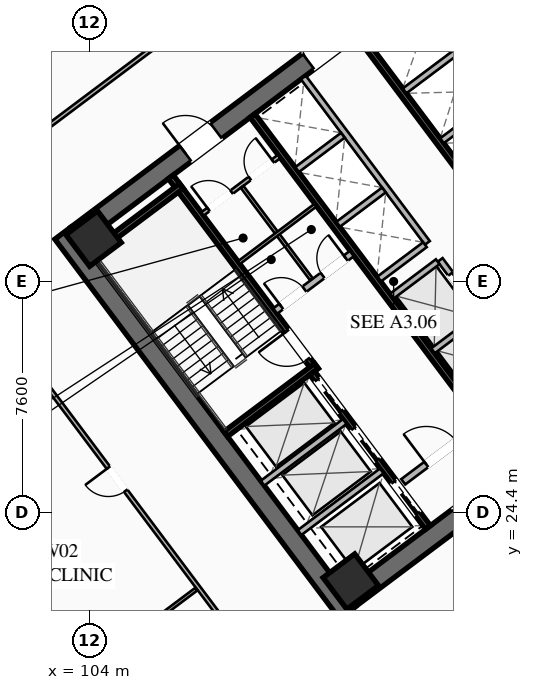
"""IFC4 building model, lengths in metres.
Left out: names, types, materials, properties, quantities, classifications, styles, units other than length and angle.
Written with IfcOpenShell. Run it as: python <this file> out.ifc"""

import sys

from ifc_helpers import new_model, si_unit, direction, frame, frame_2d, origin, origin_2d, place, context, subcontext, project, spatial, rectangle, hollow_rectangle, extrude, element, fill, save


model = new_model("IFC4")
c1 = context("Model", 3, precision=1e-05, world=origin(), true_north=direction((0.0, 1.0)))
c2 = subcontext(c1, "Body", "Model", "MODEL_VIEW")
j1 = project(units=[si_unit("LENGTHUNIT", "METRE"), si_unit("PLANEANGLEUNIT", "RADIAN")], contexts=[c1])
p1 = place(None, origin())
s1 = spatial("IfcSite", under=j1, at=p1, CompositionType="ELEMENT")
p2 = place(p1, origin())
s2 = spatial("IfcBuilding", under=s1, at=p2, CompositionType="ELEMENT")
p3 = place(p2, frame((0.0, 0.0, 88.5)))
s3 = spatial("IfcBuildingStorey", under=s2, at=p3, CompositionType="ELEMENT", Elevation=88.5)
for number, where, z_axis, x_axis in (
    (1, (112.476, 21.107, 0.0), (0.0, 0.0, 1.0), (-0.6, 0.8, 0.0)),
    (2, (115.524, 42.893, 0.0), (0.0, 0.0, 1.0), (0.6, -0.8, 0.0)),
):
    element("IfcWall", number, at=place(p3, frame(where, z_axis=z_axis, x_axis=x_axis)), inside=s3, PredefinedType="SHEAR", context=c2, shape_type="SweptSolid", body=[
        extrude(rectangle(XDim=15.6, YDim=0.65, at=frame_2d((7.8, 0.0))), origin(), (0.0, 0.0, 1.0), 3.55),
    ])
p4 = place(p3, frame((124.429, 30.478, 0.0), z_axis=(0.0, 0.0, 1.0), x_axis=(-0.799998028465, -0.600002628705, 0.0)))
e3 = element("IfcWall", 3, at=p4, inside=s3, PredefinedType="SHEAR", context=c2, shape_type="SweptSolid", body=[
    extrude(rectangle(XDim=14.86, YDim=0.65, at=frame_2d((7.43, 0.0))), origin(), (0.0, 0.0, 1.0), 3.55),
])
p5 = place(p4, frame((9.13, 0.0, 0.0)))
e4 = element("IfcOpeningElement", 4, at=p5, cuts=e3, PredefinedType="OPENING", context=c2, shape_type="SweptSolid", body=[
    extrude(rectangle(XDim=1.25, YDim=2.25, at=frame_2d((0.625, 1.125))), frame((0.0, 0.335, 0.0), z_axis=(0.0, -1.0, 0.0), x_axis=(1.0, 0.0, 0.0)), (0.0, 0.0, 1.0), 0.67),
])
p6 = place(p4, frame((4.08, 0.0, 0.0)))
e5 = element("IfcOpeningElement", 5, at=p6, cuts=e3, PredefinedType="OPENING", context=c2, shape_type="SweptSolid", body=[
    extrude(rectangle(XDim=1.25, YDim=2.25, at=frame_2d((0.625, 1.125))), frame((0.0, 0.335, 0.0), z_axis=(0.0, -1.0, 0.0), x_axis=(1.0, 0.0, 0.0)), (0.0, 0.0, 1.0), 0.67),
])
p7 = place(p3, frame((103.571, 33.522, 0.0), z_axis=(0.0, 0.0, 1.0), x_axis=(0.799998028465, 0.600002628705, 0.0)))
e6 = element("IfcWall", 6, at=p7, inside=s3, PredefinedType="SHEAR", context=c2, shape_type="SweptSolid", body=[
    extrude(rectangle(XDim=14.86, YDim=0.65, at=frame_2d((7.43, 0.0))), origin(), (0.0, 0.0, 1.0), 3.55),
])
p8 = place(p7, frame((4.48, 0.0, 0.0)))
e7 = element("IfcOpeningElement", 7, at=p8, cuts=e6, PredefinedType="OPENING", context=c2, shape_type="SweptSolid", body=[
    extrude(rectangle(XDim=1.25, YDim=2.25, at=frame_2d((0.625, 1.125))), frame((0.0, 0.335, 0.0), z_axis=(0.0, -1.0, 0.0), x_axis=(1.0, 0.0, 0.0)), (0.0, 0.0, 1.0), 0.67),
])
p9 = place(p7, frame((9.53, 0.0, 0.0)))
e8 = element("IfcOpeningElement", 8, at=p9, cuts=e6, PredefinedType="OPENING", context=c2, shape_type="SweptSolid", body=[
    extrude(rectangle(XDim=1.25, YDim=2.25, at=frame_2d((0.625, 1.125))), frame((0.0, 0.335, 0.0), z_axis=(0.0, -1.0, 0.0), x_axis=(1.0, 0.0, 0.0)), (0.0, 0.0, 1.0), 0.67),
])
for number, where, z_axis, x_axis in (
    (9, (112.59, 22.13, 0.0), (0.0, 0.0, 1.0), (0.8, 0.6, 0.0)),
    (10, (104.13, 33.41, 0.0), (0.0, 0.0, 1.0), (0.8, 0.6, 0.0)),
):
    element("IfcColumn", number, at=place(p3, frame(where, z_axis=z_axis, x_axis=x_axis)), inside=s3, PredefinedType="COLUMN", context=c2, shape_type="SweptSolid", body=[
        extrude(hollow_rectangle(XDim=1.3, YDim=1.3, WallThickness=0.05, at=origin_2d()), origin(), (0.0, 0.0, 1.0), 3.35),
    ])
p10 = place(p3, frame((111.44, 29.08, 0.0), z_axis=(0.0, 0.0, 1.0), x_axis=(-0.600009827119, 0.799992629566, 0.0)))
e11 = element("IfcWall", 11, at=p10, inside=s3, PredefinedType="SHEAR", context=c2, shape_type="SweptSolid", body=[
    extrude(rectangle(XDim=7.95, YDim=0.2, at=frame_2d((3.975, 0.0))), origin(), (0.0, 0.0, 1.0), 3.35),
])
p11 = place(p10, frame((0.45, 0.0, 0.0)))
e12 = element("IfcOpeningElement", 12, at=p11, cuts=e11, PredefinedType="OPENING", context=c2, shape_type="SweptSolid", body=[
    extrude(rectangle(XDim=1.15, YDim=2.2, at=frame_2d((0.575, 1.1))), frame((0.0, 0.11, 0.0), z_axis=(0.0, -1.0, 0.0), x_axis=(1.0, 0.0, 0.0)), (0.0, 0.0, 1.0), 0.22),
])
for number, where, z_axis, x_axis in (
    (13, (108.476, 26.982, 0.0), (0.0, 0.0, 1.0), (0.8, 0.6, 0.0)),
    (14, (104.036, 32.902, 0.0), (0.0, 0.0, 1.0), (0.8, 0.6, 0.0)),
):
    element("IfcWall", number, at=place(p3, frame(where, z_axis=z_axis, x_axis=x_axis)), inside=s3, PredefinedType="SHEAR", context=c2, shape_type="SweptSolid", body=[
        extrude(rectangle(XDim=3.73, YDim=0.2, at=frame_2d((1.865, 0.0))), origin(), (0.0, 0.0, 1.0), 3.35),
    ])
p12 = place(p3, frame((117.938, 26.016, 0.0), z_axis=(0.0, 0.0, 1.0), x_axis=(-0.600005463273, 0.799995902516, 0.0)))
e15 = element("IfcWall", 15, at=p12, inside=s3, PredefinedType="SHEAR", context=c2, shape_type="SweptSolid", body=[
    extrude(rectangle(XDim=14.3, YDim=0.2, at=frame_2d((7.15, 0.0))), origin(), (0.0, 0.0, 1.0), 3.35),
])
p13 = place(p3, frame((110.104, 31.028, 0.0), z_axis=(0.0, 0.0, 1.0), x_axis=(0.800018601094, 0.59997519774, 0.0)))
e16 = element("IfcWall", 16, at=p13, inside=s3, PredefinedType="SOLIDWALL", context=c2, shape_type="SweptSolid", body=[
    extrude(rectangle(XDim=3.15, YDim=0.22, at=frame_2d((1.575, 0.0))), origin(), (0.0, 0.0, 1.0), 2.703),
])
p14 = place(p13, frame((0.25, 0.0, 0.0)))
e17 = element("IfcOpeningElement", 17, at=p14, cuts=e16, PredefinedType="OPENING", context=c2, shape_type="SweptSolid", body=[
    extrude(rectangle(XDim=0.95, YDim=2.05, at=frame_2d((0.475, 1.025))), frame((0.0, 0.12, 0.0), z_axis=(0.0, -1.0, 0.0), x_axis=(1.0, 0.0, 0.0)), (0.0, 0.0, 1.0), 0.24),
])
p15 = place(p13, frame((1.95, 0.0, 0.0)))
e18 = element("IfcOpeningElement", 18, at=p15, cuts=e16, PredefinedType="OPENING", context=c2, shape_type="SweptSolid", body=[
    extrude(rectangle(XDim=0.95, YDim=2.05, at=frame_2d((0.475, 1.025))), frame((0.0, 0.12, 0.0), z_axis=(0.0, -1.0, 0.0), x_axis=(1.0, 0.0, 0.0)), (0.0, 0.0, 1.0), 0.24),
])
p16 = place(p3, frame((114.316, 25.412, 0.0), z_axis=(0.0, 0.0, 1.0), x_axis=(0.800018601094, 0.59997519774, 0.0)))
e19 = element("IfcWall", 19, at=p16, inside=s3, PredefinedType="SOLIDWALL", context=c2, shape_type="SweptSolid", body=[
    extrude(rectangle(XDim=3.15, YDim=0.22, at=frame_2d((1.575, 0.0))), origin(), (0.0, 0.0, 1.0), 2.703),
])
p17 = place(p16, frame((0.95, 0.0, 0.0)))
e20 = element("IfcOpeningElement", 20, at=p17, cuts=e19, PredefinedType="OPENING", context=c2, shape_type="SweptSolid", body=[
    extrude(rectangle(XDim=1.25, YDim=2.25, at=frame_2d((0.625, 1.125))), frame((0.0, 0.12, 0.0), z_axis=(0.0, -1.0, 0.0), x_axis=(1.0, 0.0, 0.0)), (0.0, 0.0, 1.0), 0.24),
])
p18 = place(p3, frame((115.13, 23.91, 0.0), z_axis=(0.0, 0.0, 1.0), x_axis=(-0.599975393228, 0.800018454488, 0.0)))
e21 = element("IfcWall", 21, at=p18, inside=s3, PredefinedType="SHEAR", context=c2, shape_type="SweptSolid", body=[
    extrude(rectangle(XDim=6.35, YDim=0.2, at=frame_2d((3.175, 0.0))), origin(), (0.0, 0.0, 1.0), 3.35),
])
p19 = place(p18, frame((4.775, 0.0, 0.0)))
e22 = element("IfcOpeningElement", 22, at=p19, cuts=e21, PredefinedType="OPENING", context=c2, shape_type="SweptSolid", body=[
    extrude(rectangle(XDim=1.3, YDim=2.25, at=frame_2d((0.65, 1.125))), frame((0.0, 0.11, 0.0), z_axis=(0.0, -1.0, 0.0), x_axis=(1.0, 0.0, 0.0)), (0.0, 0.0, 1.0), 0.22),
])
p20 = place(p18, frame((2.775, 0.0, 0.0)))
e23 = element("IfcOpeningElement", 23, at=p20, cuts=e21, PredefinedType="OPENING", context=c2, shape_type="SweptSolid", body=[
    extrude(rectangle(XDim=1.3, YDim=2.25, at=frame_2d((0.65, 1.125))), frame((0.0, 0.11, 0.0), z_axis=(0.0, -1.0, 0.0), x_axis=(1.0, 0.0, 0.0)), (0.0, 0.0, 1.0), 0.22),
])
p21 = place(p18, frame((0.575, 0.0, 0.0)))
e24 = element("IfcOpeningElement", 24, at=p21, cuts=e21, PredefinedType="OPENING", context=c2, shape_type="SweptSolid", body=[
    extrude(rectangle(XDim=1.3, YDim=2.25, at=frame_2d((0.65, 1.125))), frame((0.0, 0.11, 0.0), z_axis=(0.0, -1.0, 0.0), x_axis=(1.0, 0.0, 0.0)), (0.0, 0.0, 1.0), 0.22),
])
for number, where, z_axis, x_axis in (
    (25, (110.906, 23.742, 0.0), (0.0, 0.0, 1.0), (0.8, 0.6, 0.0)),
    (26, (109.688, 25.366, 0.0), (0.0, 0.0, 1.0), (0.8, 0.6, 0.0)),
):
    element("IfcWall", number, at=place(p3, frame(where, z_axis=z_axis, x_axis=x_axis)), inside=s3, PredefinedType="SOLIDWALL", context=c2, shape_type="SweptSolid", body=[
        extrude(rectangle(XDim=3.38, YDim=0.2, at=frame_2d((1.69, 0.0))), origin(), (0.0, 0.0, 1.0), 3.35),
    ])
p22 = place(p3, frame((112.87, 40.09, 0.0), z_axis=(0.0, 0.0, 1.0), x_axis=(0.599975393228, -0.800018454488, 0.0)))
e27 = element("IfcWall", 27, at=p22, inside=s3, PredefinedType="SHEAR", context=c2, shape_type="SweptSolid", body=[
    extrude(rectangle(XDim=6.35, YDim=0.2, at=frame_2d((3.175, 0.0))), origin(), (0.0, 0.0, 1.0), 3.35),
])
for number, where, z_axis, x_axis in (
    (28, (115.59, 36.63, 0.0), (0.0, 0.0, 1.0), (0.8, 0.6, 0.0)),
    (29, (114.36, 38.27, 0.0), (0.0, 0.0, 1.0), (0.8, 0.6, 0.0)),
):
    element("IfcWall", number, at=place(p3, frame(where, z_axis=z_axis, x_axis=x_axis)), inside=s3, PredefinedType="SOLIDWALL", context=c2, shape_type="SweptSolid", body=[
        extrude(rectangle(XDim=3.38, YDim=0.2, at=frame_2d((1.69, 0.0))), origin(), (0.0, 0.0, 1.0), 3.35),
    ])
p23 = place(p3, frame((107.71, 34.22, 0.0), z_axis=(0.0, 0.0, 1.0), x_axis=(0.799981399002, 0.60002480053, 0.0)))
e30 = element("IfcWall", 30, at=p23, inside=s3, PredefinedType="PARTITIONING", context=c2, shape_type="SweptSolid", body=[
    extrude(rectangle(XDim=3.15, YDim=0.135, at=frame_2d((1.575, 0.0))), origin(), (0.0, 0.0, 1.0), 2.703),
])
p24 = place(p23, frame((0.25, 0.0, 0.0)))
e31 = element("IfcOpeningElement", 31, at=p24, cuts=e30, PredefinedType="OPENING", context=c2, shape_type="SweptSolid", body=[
    extrude(rectangle(XDim=0.95, YDim=2.05, at=frame_2d((0.475, 1.025))), frame((0.0, 0.077, 0.0), z_axis=(0.0, -1.0, 0.0), x_axis=(1.0, 0.0, 0.0)), (0.0, 0.0, 1.0), 0.155),
])
p25 = place(p23, frame((1.95, 0.0, 0.0)))
e32 = element("IfcOpeningElement", 32, at=p25, cuts=e30, PredefinedType="OPENING", context=c2, shape_type="SweptSolid", body=[
    extrude(rectangle(XDim=0.95, YDim=2.05, at=frame_2d((0.475, 1.025))), frame((0.0, 0.077, 0.0), z_axis=(0.0, -1.0, 0.0), x_axis=(1.0, 0.0, 0.0)), (0.0, 0.0, 1.0), 0.155),
])
p26 = place(p3, frame((111.296, 32.072, 0.0), z_axis=(0.0, 0.0, 1.0), x_axis=(-0.59995887973, 0.800030838552, 0.0)))
e33 = element("IfcWall", 33, at=p26, inside=s3, PredefinedType="PARTITIONING", context=c2, shape_type="SweptSolid", body=[
    extrude(rectangle(XDim=3.8, YDim=0.11, at=frame_2d((1.9, 0.0))), origin(), (0.0, 0.0, 1.0), 2.703),
])
p27 = place(p3, frame((108.91, 32.62, 0.0), z_axis=(0.0, 0.0, 1.0), x_axis=(0.800018601094, 0.59997519774, 0.0)))
e34 = element("IfcWall", 34, at=p27, inside=s3, PredefinedType="PARTITIONING", context=c2, shape_type="SweptSolid", body=[
    extrude(rectangle(XDim=3.15, YDim=0.11, at=frame_2d((1.575, 0.0))), origin(), (0.0, 0.0, 1.0), 2.703),
])
p28 = place(p3, frame((119.61, 27.27, 0.0), z_axis=(0.0, 0.0, 1.0), x_axis=(-0.600011488909, 0.79999138319, 0.0)))
e35 = element("IfcWall", 35, at=p28, inside=s3, PredefinedType="SOLIDWALL", context=c2, shape_type="SweptSolid", body=[
    extrude(rectangle(XDim=6.8, YDim=0.2, at=frame_2d((3.4, 0.0))), origin(), (0.0, 0.0, 1.0), 3.35),
])
p29 = place(p28, frame((0.625, 0.0, 0.0)))
e36 = element("IfcOpeningElement", 36, at=p29, cuts=e35, PredefinedType="OPENING", context=c2, shape_type="SweptSolid", body=[
    extrude(rectangle(XDim=1.1, YDim=2.2, at=frame_2d((0.55, 1.1))), frame((0.0, 0.11, 0.0), z_axis=(0.0, -1.0, 0.0), x_axis=(1.0, 0.0, 0.0)), (0.0, 0.0, 1.0), 0.22),
])
p30 = place(p28, frame((2.875, 0.0, 0.0)))
e37 = element("IfcOpeningElement", 37, at=p30, cuts=e35, PredefinedType="OPENING", context=c2, shape_type="SweptSolid", body=[
    extrude(rectangle(XDim=1.1, YDim=2.2, at=frame_2d((0.55, 1.1))), frame((0.0, 0.11, 0.0), z_axis=(0.0, -1.0, 0.0), x_axis=(1.0, 0.0, 0.0)), (0.0, 0.0, 1.0), 0.22),
])
p31 = place(p28, frame((5.125, 0.0, 0.0)))
e38 = element("IfcOpeningElement", 38, at=p31, cuts=e35, PredefinedType="OPENING", context=c2, shape_type="SweptSolid", body=[
    extrude(rectangle(XDim=1.1, YDim=2.2, at=frame_2d((0.55, 1.1))), frame((0.0, 0.11, 0.0), z_axis=(0.0, -1.0, 0.0), x_axis=(1.0, 0.0, 0.0)), (0.0, 0.0, 1.0), 0.22),
])
p32 = place(p3, frame((115.296, 29.722, 0.0), z_axis=(0.0, 0.0, 1.0), x_axis=(0.799984418148, 0.600020775241, 0.0)))
e39 = element("IfcWall", 39, at=p32, inside=s3, PredefinedType="SOLIDWALL", context=c2, shape_type="SweptSolid", body=[
    extrude(rectangle(XDim=1.88, YDim=0.2, at=frame_2d((0.94, 0.0))), origin(), (0.0, 0.0, 1.0), 3.35),
])
p33 = place(p3, frame((113.946, 31.522, 0.0), z_axis=(0.0, 0.0, 1.0), x_axis=(0.8, 0.6, 0.0)))
e40 = element("IfcWall", 40, at=p33, inside=s3, PredefinedType="SOLIDWALL", context=c2, shape_type="SweptSolid", body=[
    extrude(rectangle(XDim=1.88, YDim=0.2, at=frame_2d((0.94, 0.0))), origin(), (0.0, 0.0, 1.0), 3.35),
])
p34 = place(p3, frame((115.11, 33.27, 0.0), z_axis=(0.0, 0.0, 1.0), x_axis=(-0.600011488909, 0.79999138319, 0.0)))
e41 = element("IfcWall", 41, at=p34, inside=s3, PredefinedType="SOLIDWALL", context=c2, shape_type="SweptSolid", body=[
    extrude(rectangle(XDim=6.8, YDim=0.2, at=frame_2d((3.4, 0.0))), origin(), (0.0, 0.0, 1.0), 3.35),
])
p35 = place(p3, frame((113.526, 32.082, 0.0), z_axis=(0.0, 0.0, 1.0), x_axis=(0.800046745961, 0.599937666993, 0.0)))
e42 = element("IfcWall", 42, at=p35, inside=s3, PredefinedType="SOLIDWALL", context=c2, shape_type="SweptSolid", body=[
    extrude(rectangle(XDim=1.88, YDim=0.2, at=frame_2d((0.94, 0.0))), origin(), (0.0, 0.0, 1.0), 3.35),
])
p36 = place(p3, frame((112.176, 33.882, 0.0), z_axis=(0.0, 0.0, 1.0), x_axis=(0.8, 0.6, 0.0)))
e43 = element("IfcWall", 43, at=p36, inside=s3, PredefinedType="SOLIDWALL", context=c2, shape_type="SweptSolid", body=[
    extrude(rectangle(XDim=1.88, YDim=0.2, at=frame_2d((0.94, 0.0))), origin(), (0.0, 0.0, 1.0), 3.35),
])
p37 = place(p3, frame((110.826, 35.682, 0.0), z_axis=(0.0, 0.0, 1.0), x_axis=(0.799984418148, 0.600020775241, 0.0)))
e44 = element("IfcWall", 44, at=p37, inside=s3, PredefinedType="SOLIDWALL", context=c2, shape_type="SweptSolid", body=[
    extrude(rectangle(XDim=1.88, YDim=0.2, at=frame_2d((0.94, 0.0))), origin(), (0.0, 0.0, 1.0), 3.35),
])
p38 = place(p3, frame((98.516, 34.012, 0.0), z_axis=(0.0, 0.0, 1.0), x_axis=(0.8, 0.6, 0.0)))
e45 = element("IfcWall", 45, at=p38, inside=s3, PredefinedType="PARTITIONING", context=c2, shape_type="SweptSolid", body=[
    extrude(rectangle(XDim=28.23, YDim=0.135, at=frame_2d((14.115, 0.0))), origin(), (0.0, 0.0, 1.0), 2.703),
])
p39 = place(p38, frame((0.3, 0.0, 0.0)))
e46 = element("IfcOpeningElement", 46, at=p39, cuts=e45, PredefinedType="OPENING", context=c2, shape_type="SweptSolid", body=[
    extrude(rectangle(XDim=0.95, YDim=2.05, at=frame_2d((0.475, 1.025))), frame((0.0, 0.077, 0.0), z_axis=(0.0, -1.0, 0.0), x_axis=(1.0, 0.0, 0.0)), (0.0, 0.0, 1.0), 0.155),
])
p40 = place(p38, frame((26.98, 0.0, 0.0)))
e47 = element("IfcOpeningElement", 47, at=p40, cuts=e45, PredefinedType="OPENING", context=c2, shape_type="SweptSolid", body=[
    extrude(rectangle(XDim=0.95, YDim=2.05, at=frame_2d((0.475, 1.025))), frame((0.0, 0.077, 0.0), z_axis=(0.0, -1.0, 0.0), x_axis=(1.0, 0.0, 0.0)), (0.0, 0.0, 1.0), 0.155),
])
p41 = place(p3, frame((134.582, 32.974, 0.0), z_axis=(0.0, 0.0, 1.0), x_axis=(-0.799995848831, -0.600005534853, 0.0)))
e48 = element("IfcWall", 48, at=p41, inside=s3, PredefinedType="PARTITIONING", context=c2, shape_type="SweptSolid", body=[
    extrude(rectangle(XDim=28.23, YDim=0.135, at=frame_2d((14.115, 0.0))), origin(), (0.0, 0.0, 1.0), 2.703),
])
p42 = place(p41, frame((26.9, 0.0, 0.0)))
e49 = element("IfcOpeningElement", 49, at=p42, cuts=e48, PredefinedType="OPENING", context=c2, shape_type="SweptSolid", body=[
    extrude(rectangle(XDim=0.95, YDim=2.05, at=frame_2d((0.475, 1.025))), frame((0.0, 0.077, 0.0), z_axis=(0.0, -1.0, 0.0), x_axis=(1.0, 0.0, 0.0)), (0.0, 0.0, 1.0), 0.155),
])
p43 = place(p41, frame((0.38, 0.0, 0.0)))
e50 = element("IfcOpeningElement", 50, at=p43, cuts=e48, PredefinedType="OPENING", context=c2, shape_type="SweptSolid", body=[
    extrude(rectangle(XDim=0.95, YDim=2.05, at=frame_2d((0.475, 1.025))), frame((0.0, 0.077, 0.0), z_axis=(0.0, -1.0, 0.0), x_axis=(1.0, 0.0, 0.0)), (0.0, 0.0, 1.0), 0.155),
])
p44 = place(p3, frame((111.95, 16.1, 0.0), z_axis=(0.0, 0.0, 1.0), x_axis=(-0.600001750902, 0.799998686821, 0.0)))
e51 = element("IfcWall", 51, at=p44, inside=s3, PredefinedType="PARTITIONING", context=c2, shape_type="SweptSolid", body=[
    extrude(rectangle(XDim=22.31, YDim=0.135, at=frame_2d((11.155, 0.0))), origin(), (0.0, 0.0, 1.0), 2.703),
])
p45 = place(p44, frame((0.3, 0.0, 0.0)))
e52 = element("IfcOpeningElement", 52, at=p45, cuts=e51, PredefinedType="OPENING", context=c2, shape_type="SweptSolid", body=[
    extrude(rectangle(XDim=0.95, YDim=2.05, at=frame_2d((0.475, 1.025))), frame((0.0, 0.077, 0.0), z_axis=(0.0, -1.0, 0.0), x_axis=(1.0, 0.0, 0.0)), (0.0, 0.0, 1.0), 0.155),
])
p46 = place(p44, frame((11.272, 0.0, 0.0)))
e53 = element("IfcOpeningElement", 53, at=p46, cuts=e51, PredefinedType="OPENING", context=c2, shape_type="SweptSolid", body=[
    extrude(rectangle(XDim=0.95, YDim=2.05, at=frame_2d((0.475, 1.025))), frame((0.0, 0.077, 0.0), z_axis=(0.0, -1.0, 0.0), x_axis=(1.0, 0.0, 0.0)), (0.0, 0.0, 1.0), 0.155),
])
p47 = place(p44, frame((21.06, 0.0, 0.0)))
e54 = element("IfcOpeningElement", 54, at=p47, cuts=e51, PredefinedType="OPENING", context=c2, shape_type="SweptSolid", body=[
    extrude(rectangle(XDim=0.95, YDim=2.05, at=frame_2d((0.475, 1.025))), frame((0.0, 0.077, 0.0), z_axis=(0.0, -1.0, 0.0), x_axis=(1.0, 0.0, 0.0)), (0.0, 0.0, 1.0), 0.155),
])
p48 = place(p3, frame((100.736, 16.802, 0.0), z_axis=(0.0, 0.0, 1.0), x_axis=(0.799993082085, 0.600009223776, 0.0)))
e55 = element("IfcWall", 55, at=p48, inside=s3, PredefinedType="PARTITIONING", context=c2, shape_type="SweptSolid", body=[
    extrude(rectangle(XDim=8.47, YDim=0.11, at=frame_2d((4.235, 0.0))), origin(), (0.0, 0.0, 1.0), 2.703),
])
p49 = place(p8, origin())
e56 = element("IfcDoor", 56, at=p49, inside=s3, OperationType="SINGLE_SWING_LEFT", PredefinedType="DOOR", context=c2, shape_type="SweptSolid", body=[
    extrude(rectangle(XDim=1.25, YDim=2.25, at=frame_2d((0.625, 1.125))), frame((0.0, 0.025, 0.0), z_axis=(0.0, -1.0, 0.0), x_axis=(1.0, 0.0, 0.0)), (0.0, 0.0, 1.0), 0.05),
])
fill(e7, e56)
p50 = place(p9, origin())
e57 = element("IfcDoor", 57, at=p50, inside=s3, OperationType="SINGLE_SWING_RIGHT", PredefinedType="DOOR", context=c2, shape_type="SweptSolid", body=[
    extrude(rectangle(XDim=1.25, YDim=2.25, at=frame_2d((0.625, 1.125))), frame((0.0, 0.025, 0.0), z_axis=(0.0, -1.0, 0.0), x_axis=(1.0, 0.0, 0.0)), (0.0, 0.0, 1.0), 0.05),
])
fill(e8, e57)
p51 = place(p11, origin())
e58 = element("IfcDoor", 58, at=p51, inside=s3, OperationType="SINGLE_SWING_RIGHT", PredefinedType="DOOR", context=c2, shape_type="SweptSolid", body=[
    extrude(rectangle(XDim=1.15, YDim=2.2, at=frame_2d((0.575, 1.1))), frame((0.0, 0.025, 0.0), z_axis=(0.0, -1.0, 0.0), x_axis=(1.0, 0.0, 0.0)), (0.0, 0.0, 1.0), 0.05),
])
fill(e12, e58)
p52 = place(p17, origin())
e59 = element("IfcDoor", 59, at=p52, inside=s3, OperationType="SINGLE_SWING_LEFT", PredefinedType="DOOR", context=c2, shape_type="SweptSolid", body=[
    extrude(rectangle(XDim=1.25, YDim=2.25, at=frame_2d((0.625, 1.125))), frame((0.0, 0.025, 0.0), z_axis=(0.0, -1.0, 0.0), x_axis=(1.0, 0.0, 0.0)), (0.0, 0.0, 1.0), 0.05),
])
fill(e20, e59)
p53 = place(p24, origin())
e60 = element("IfcDoor", 60, at=p53, inside=s3, OperationType="SINGLE_SWING_LEFT", PredefinedType="DOOR", context=c2, shape_type="SweptSolid", body=[
    extrude(rectangle(XDim=0.95, YDim=2.05, at=frame_2d((0.475, 1.025))), frame((0.0, 0.025, 0.0), z_axis=(0.0, -1.0, 0.0), x_axis=(1.0, 0.0, 0.0)), (0.0, 0.0, 1.0), 0.05),
])
fill(e31, e60)
p54 = place(p25, origin())
e61 = element("IfcDoor", 61, at=p54, inside=s3, OperationType="SINGLE_SWING_RIGHT", PredefinedType="DOOR", context=c2, shape_type="SweptSolid", body=[
    extrude(rectangle(XDim=0.95, YDim=2.05, at=frame_2d((0.475, 1.025))), frame((0.0, 0.025, 0.0), z_axis=(0.0, -1.0, 0.0), x_axis=(1.0, 0.0, 0.0)), (0.0, 0.0, 1.0), 0.05),
])
fill(e32, e61)
p55 = place(p14, origin())
e62 = element("IfcDoor", 62, at=p55, inside=s3, OperationType="SINGLE_SWING_LEFT", PredefinedType="DOOR", context=c2, shape_type="SweptSolid", body=[
    extrude(rectangle(XDim=0.95, YDim=2.05, at=frame_2d((0.475, 1.025))), frame((0.0, 0.025, 0.0), z_axis=(0.0, -1.0, 0.0), x_axis=(1.0, 0.0, 0.0)), (0.0, 0.0, 1.0), 0.05),
])
fill(e17, e62)
p56 = place(p15, origin())
e63 = element("IfcDoor", 63, at=p56, inside=s3, OperationType="SINGLE_SWING_RIGHT", PredefinedType="DOOR", context=c2, shape_type="SweptSolid", body=[
    extrude(rectangle(XDim=0.95, YDim=2.05, at=frame_2d((0.475, 1.025))), frame((0.0, 0.025, 0.0), z_axis=(0.0, -1.0, 0.0), x_axis=(1.0, 0.0, 0.0)), (0.0, 0.0, 1.0), 0.05),
])
fill(e18, e63)
p57 = place(p46, origin())
e64 = element("IfcDoor", 64, at=p57, inside=s3, OperationType="SINGLE_SWING_RIGHT", PredefinedType="DOOR", context=c2, shape_type="SweptSolid", body=[
    extrude(rectangle(XDim=0.95, YDim=2.05, at=frame_2d((0.475, 1.025))), frame((0.0, 0.025, 0.0), z_axis=(0.0, -1.0, 0.0), x_axis=(1.0, 0.0, 0.0)), (0.0, 0.0, 1.0), 0.05),
])
fill(e53, e64)
p58 = place(p19, origin())
e65 = element("IfcDoor", 65, at=p58, inside=s3, OperationType="SLIDING_TO_LEFT", PredefinedType="DOOR", context=c2, shape_type="SweptSolid", body=[
    extrude(rectangle(XDim=1.3, YDim=2.25, at=frame_2d((0.65, 1.125))), frame((0.0, 0.025, 0.0), z_axis=(0.0, -1.0, 0.0), x_axis=(1.0, 0.0, 0.0)), (0.0, 0.0, 1.0), 0.05),
])
fill(e22, e65)
p59 = place(p20, origin())
e66 = element("IfcDoor", 66, at=p59, inside=s3, OperationType="SLIDING_TO_LEFT", PredefinedType="DOOR", context=c2, shape_type="SweptSolid", body=[
    extrude(rectangle(XDim=1.3, YDim=2.25, at=frame_2d((0.65, 1.125))), frame((0.0, 0.025, 0.0), z_axis=(0.0, -1.0, 0.0), x_axis=(1.0, 0.0, 0.0)), (0.0, 0.0, 1.0), 0.05),
])
fill(e23, e66)
p60 = place(p21, origin())
e67 = element("IfcDoor", 67, at=p60, inside=s3, OperationType="SLIDING_TO_LEFT", PredefinedType="DOOR", context=c2, shape_type="SweptSolid", body=[
    extrude(rectangle(XDim=1.3, YDim=2.25, at=frame_2d((0.65, 1.125))), frame((0.0, 0.025, 0.0), z_axis=(0.0, -1.0, 0.0), x_axis=(1.0, 0.0, 0.0)), (0.0, 0.0, 1.0), 0.05),
])
fill(e24, e67)
p61 = place(p31, origin())
e68 = element("IfcDoor", 68, at=p61, inside=s3, OperationType="SLIDING_TO_LEFT", PredefinedType="DOOR", context=c2, shape_type="SweptSolid", body=[
    extrude(rectangle(XDim=1.1, YDim=2.2, at=frame_2d((0.55, 1.1))), frame((0.0, 0.025, 0.0), z_axis=(0.0, -1.0, 0.0), x_axis=(1.0, 0.0, 0.0)), (0.0, 0.0, 1.0), 0.05),
])
fill(e38, e68)
save(model, sys.argv[1])
